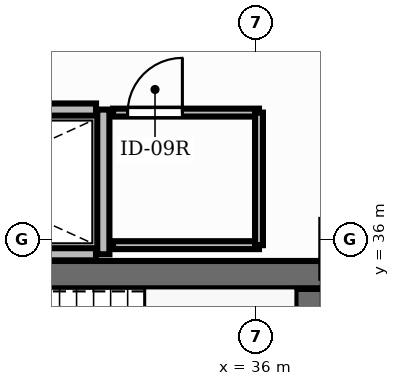
"""IFC4 building model, lengths in metres.
Left out: names, types, materials, properties, quantities, classifications, styles, units other than length and angle.
Written with IfcOpenShell. Run it as: python <this file> out.ifc"""

import sys

from ifc_helpers import new_model, si_unit, direction, frame, frame_2d, origin, place, context, subcontext, project, spatial, rectangle, extrude, element, fill, save


model = new_model("IFC4")
c1 = context("Model", 3, precision=1e-05, world=origin(), true_north=direction((0.0, 1.0)))
c2 = subcontext(c1, "Body", "Model", "MODEL_VIEW")
j1 = project(units=[si_unit("LENGTHUNIT", "METRE"), si_unit("PLANEANGLEUNIT", "RADIAN")], contexts=[c1])
p1 = place(None, origin())
s1 = spatial("IfcSite", under=j1, at=p1, CompositionType="ELEMENT")
p2 = place(p1, origin())
s2 = spatial("IfcBuilding", under=s1, at=p2, CompositionType="ELEMENT")
p3 = place(p2, frame((0.0, 0.0, 20.4)))
s3 = spatial("IfcBuildingStorey", under=s2, at=p3, CompositionType="ELEMENT", Elevation=20.4)
p4 = place(p3, frame((28.852, 35.425, 0.0), z_axis=(0.0, 0.0, 1.0), x_axis=(1.0, 0.0, 0.0)))
e1 = element("IfcWall", 1, at=p4, inside=s3, PredefinedType="SHEAR", context=c2, shape_type="SweptSolid", body=[
    extrude(rectangle(XDim=8.248, YDim=0.45, at=frame_2d((4.124, 0.0))), origin(), (0.0, 0.0, 1.0), 5.1),
])
p5 = place(p3, frame((36.875, 32.11, 0.0), z_axis=(0.0, 0.0, 1.0), x_axis=(0.0, 1.0, 0.0)))
e2 = element("IfcWall", 2, at=p5, inside=s3, PredefinedType="SHEAR", context=c2, shape_type="SweptSolid", body=[
    extrude(rectangle(XDim=3.08, YDim=0.45, at=frame_2d((1.54, 0.0))), origin(), (0.0, 0.0, 1.0), 5.1),
])
p6 = place(p3, frame((33.49, 35.76, 0.0), z_axis=(0.0, 0.0, 1.0), x_axis=(0.0, 1.0, 0.0)))
e3 = element("IfcWall", 3, at=p6, inside=s3, PredefinedType="PARTITIONING", context=c2, shape_type="SweptSolid", body=[
    extrude(rectangle(XDim=2.38, YDim=0.2, at=frame_2d((1.19, 0.0))), origin(), (0.0, 0.0, 1.0), 4.11),
])
for number, where, z_axis, x_axis in (
    (4, (28.8, 35.76, 0.0), (0.0, 0.0, 1.0), (1.0, 0.0, 0.0)),
    (5, (28.8, 38.14, 0.0), (0.0, 0.0, 1.0), (1.0, 0.0, 0.0)),
):
    element("IfcWall", number, at=place(p3, frame(where, z_axis=z_axis, x_axis=x_axis)), inside=s3, PredefinedType="PARTITIONING", context=c2, shape_type="SweptSolid", body=[
        extrude(rectangle(XDim=4.57, YDim=0.2, at=frame_2d((2.285, 0.0))), origin(), (0.0, 0.0, 1.0), 4.11),
    ])
p7 = place(p3, frame((33.65, 38.09, 0.0), z_axis=(0.0, 0.0, 1.0), x_axis=(1.0, 0.0, 0.0)))
e6 = element("IfcWall", 6, at=p7, inside=s3, PredefinedType="PARTITIONING", context=c2, shape_type="SweptSolid", body=[
    extrude(rectangle(XDim=2.4, YDim=0.13, at=frame_2d((1.2, 0.0))), origin(), (0.0, 0.0, 1.0), 4.11),
])
p8 = place(p7, frame((0.24, 0.0, 0.0)))
e7 = element("IfcOpeningElement", 7, at=p8, cuts=e6, PredefinedType="OPENING", context=c2, shape_type="SweptSolid", body=[
    extrude(rectangle(XDim=0.9, YDim=2.15, at=frame_2d((0.45, 1.075))), frame((0.0, 0.08, 0.0), z_axis=(0.0, -1.0, 0.0), x_axis=(1.0, 0.0, 0.0)), (0.0, 0.0, 1.0), 0.16),
])
p9 = place(p3, frame((36.05, 35.91, 0.0), z_axis=(0.0, 0.0, 1.0), x_axis=(-1.0, 0.0, 0.0)))
e8 = element("IfcWall", 8, at=p9, inside=s3, PredefinedType="PARTITIONING", context=c2, shape_type="SweptSolid", body=[
    extrude(rectangle(XDim=2.4, YDim=0.13, at=frame_2d((1.2, 0.0))), origin(), (0.0, 0.0, 1.0), 4.11),
])
p10 = place(p3, frame((36.05, 38.09, 0.0), z_axis=(0.0, 0.0, 1.0), x_axis=(0.0, -1.0, 0.0)))
e9 = element("IfcWall", 9, at=p10, inside=s3, PredefinedType="PARTITIONING", context=c2, shape_type="SweptSolid", body=[
    extrude(rectangle(XDim=2.18, YDim=0.13, at=frame_2d((1.09, 0.0))), origin(), (0.0, 0.0, 1.0), 4.11),
])
p11 = place(p8, origin())
e10 = element("IfcDoor", 10, at=p11, inside=s3, OperationType="SINGLE_SWING_RIGHT", PredefinedType="DOOR", context=c2, shape_type="SweptSolid", body=[
    extrude(rectangle(XDim=0.9, YDim=2.15, at=frame_2d((0.45, 1.075))), frame((0.0, 0.025, 0.0), z_axis=(0.0, -1.0, 0.0), x_axis=(1.0, 0.0, 0.0)), (0.0, 0.0, 1.0), 0.05),
])
fill(e7, e10)
save(model, sys.argv[1])
